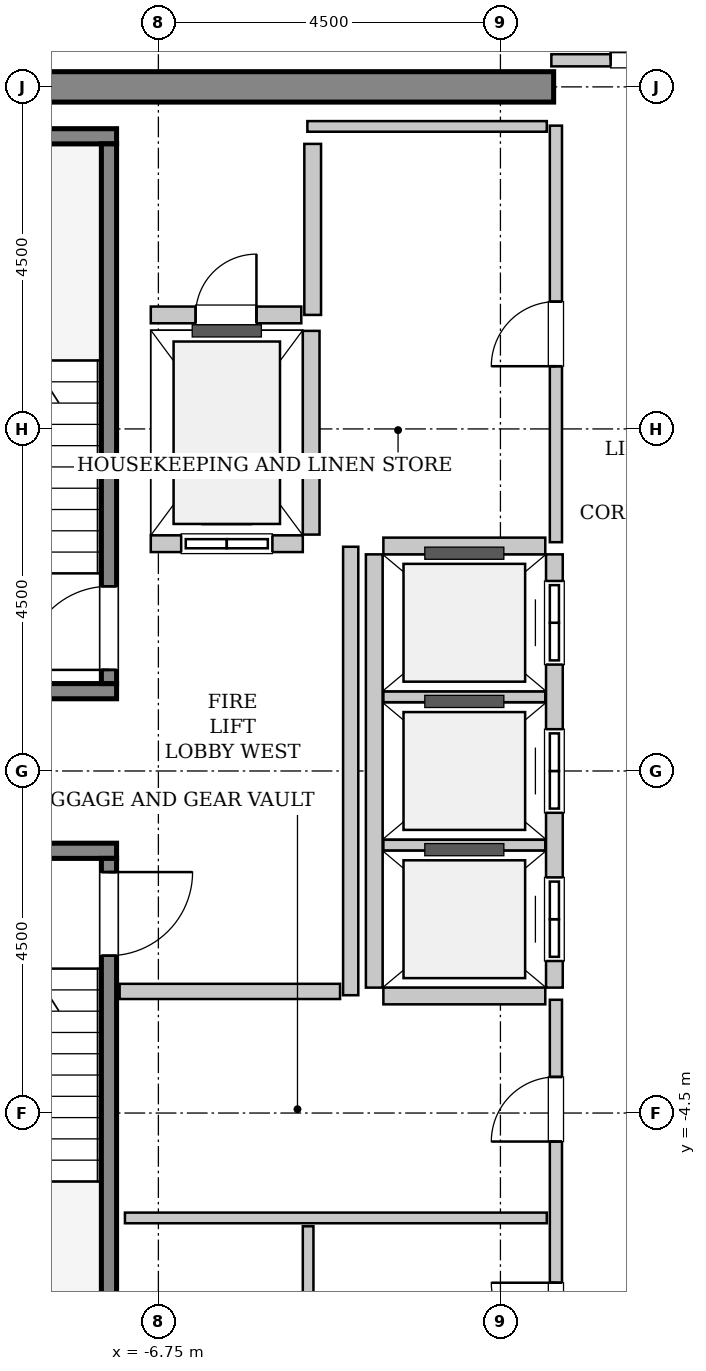
"""IFC4 building model, lengths in metres.
Left out: names, types, materials, properties, quantities, classifications, styles, units other than length and angle.
Written with IfcOpenShell. Run it as: python <this file> out.ifc"""

import sys

from ifc_helpers import new_model, si_unit, direction, frame, frame_2d, origin, place, context, subcontext, project, spatial, rectangle, extrude, source, transform, mapped, element, fill, save


model = new_model("IFC4")
c1 = context("Model", 3, precision=1e-05, world=origin(), true_north=direction((0.0, 1.0)))
c2 = subcontext(c1, "Body", "Model", "MODEL_VIEW")
j1 = project(units=[si_unit("LENGTHUNIT", "METRE"), si_unit("PLANEANGLEUNIT", "RADIAN")], contexts=[c1])
p1 = place(None, origin())
s1 = spatial("IfcSite", under=j1, at=p1, CompositionType="ELEMENT")
p2 = place(p1, origin())
s2 = spatial("IfcBuilding", under=s1, at=p2, CompositionType="ELEMENT")
p3 = place(p2, frame((0.0, 0.0, 322.4)))
s3 = spatial("IfcBuildingStorey", under=s2, at=p3, CompositionType="ELEMENT", Elevation=322.4)
m1 = source(origin(), c2, "Body", "SweptSolid", [
    extrude(rectangle(XDim=9.9, YDim=0.4, at=frame_2d((4.95, 0.0))), origin(), (0.0, 0.0, 1.0), 3.8),
])
p4 = place(p3, frame((-11.45, 9.0, 0.0), z_axis=(0.0, 0.0, 1.0), x_axis=(1.0, 0.0, 0.0)))
e1 = element("IfcWall", 1, at=p4, inside=s3, PredefinedType="SHEAR", context=c2, shape_type="MappedRepresentation", body=[
    mapped(m1, transform((0.0, 0.0, 0.0), x_axis=(1.0, 0.0, 0.0), y_axis=(0.0, 1.0, 0.0), z_axis=(0.0, 0.0, 1.0), scale=1.0)),
])
m2 = source(origin(), c2, "Body", "SweptSolid", [
    extrude(rectangle(XDim=3.4, YDim=0.2, at=frame_2d((1.7, 0.0))), origin(), (0.0, 0.0, 1.0), 3.8),
])
p5 = place(p3, frame((-7.3, 1.05, 0.0), z_axis=(0.0, 0.0, 1.0), x_axis=(-1.0, 0.0, 0.0)))
e2 = element("IfcWall", 2, at=p5, inside=s3, PredefinedType="SOLIDWALL", context=c2, shape_type="MappedRepresentation", body=[
    mapped(m2, transform((0.0, 0.0, 0.0), x_axis=(1.0, 0.0, 0.0), y_axis=(0.0, 1.0, 0.0), z_axis=(0.0, 0.0, 1.0), scale=1.0)),
])
m3 = source(origin(), c2, "Body", "SweptSolid", [
    extrude(rectangle(XDim=3.755, YDim=0.2, at=frame_2d((1.877, 0.0))), origin(), (0.0, 0.0, 1.0), 3.8),
])
p6 = place(p3, frame((-7.3, 8.35, 0.0), z_axis=(0.0, 0.0, 1.0), x_axis=(-1.0, 0.0, 0.0)))
e3 = element("IfcWall", 3, at=p6, inside=s3, PredefinedType="SOLIDWALL", context=c2, shape_type="MappedRepresentation", body=[
    mapped(m3, transform((0.0, 0.0, 0.0), x_axis=(1.0, 0.0, 0.0), y_axis=(0.0, 1.0, 0.0), z_axis=(0.0, 0.0, 1.0), scale=1.0)),
])
m4 = source(origin(), c2, "Body", "SweptSolid", [
    extrude(rectangle(XDim=7.1, YDim=0.2, at=frame_2d((3.55, 0.0))), origin(), (0.0, 0.0, 1.0), 3.8),
])
p7 = place(p3, frame((-7.4, 1.15, 0.0), z_axis=(0.0, 0.0, 1.0), x_axis=(0.0, 1.0, 0.0)))
e4 = element("IfcWall", 4, at=p7, inside=s3, PredefinedType="SOLIDWALL", context=c2, shape_type="MappedRepresentation", body=[
    mapped(m4, transform((0.0, 0.0, 0.0), x_axis=(1.0, 0.0, 0.0), y_axis=(0.0, 1.0, 0.0), z_axis=(0.0, 0.0, 1.0), scale=1.0)),
])
p8 = place(p7, frame((0.18, 0.0, 0.0)))
e5 = element("IfcOpeningElement", 5, at=p8, cuts=e4, PredefinedType="OPENING", context=c2, shape_type="SweptSolid", body=[
    extrude(rectangle(XDim=1.1, YDim=2.15, at=frame_2d((0.55, 1.075))), frame((0.0, 0.11, 0.0), z_axis=(0.0, -1.0, 0.0), x_axis=(1.0, 0.0, 0.0)), (0.0, 0.0, 1.0), 0.22),
])
p9 = place(p3, frame((-10.7, -1.05, 0.0), z_axis=(0.0, 0.0, 1.0), x_axis=(1.0, 0.0, 0.0)))
e6 = element("IfcWall", 6, at=p9, inside=s3, PredefinedType="SOLIDWALL", context=c2, shape_type="MappedRepresentation", body=[
    mapped(m2, transform((0.0, 0.0, 0.0), x_axis=(1.0, 0.0, 0.0), y_axis=(0.0, 1.0, 0.0), z_axis=(0.0, 0.0, 1.0), scale=1.0)),
])
p10 = place(p3, frame((-7.4, -1.15, 0.0), z_axis=(0.0, 0.0, 1.0), x_axis=(0.0, -1.0, 0.0)))
e7 = element("IfcWall", 7, at=p10, inside=s3, PredefinedType="SOLIDWALL", context=c2, shape_type="MappedRepresentation", body=[
    mapped(m4, transform((0.0, 0.0, 0.0), x_axis=(1.0, 0.0, 0.0), y_axis=(0.0, 1.0, 0.0), z_axis=(0.0, 0.0, 1.0), scale=1.0)),
])
p11 = place(p10, frame((0.18, 0.0, 0.0)))
e8 = element("IfcOpeningElement", 8, at=p11, cuts=e7, PredefinedType="OPENING", context=c2, shape_type="SweptSolid", body=[
    extrude(rectangle(XDim=1.1, YDim=2.15, at=frame_2d((0.55, 1.075))), frame((0.0, 0.11, 0.0), z_axis=(0.0, -1.0, 0.0), x_axis=(1.0, 0.0, 0.0)), (0.0, 0.0, 1.0), 0.22),
])
m5 = source(origin(), c2, "Body", "SweptSolid", [
    extrude(rectangle(XDim=2.0, YDim=0.22, at=frame_2d((1.0, 0.0))), origin(), (0.0, 0.0, 1.0), 3.535),
])
p12 = place(p3, frame((-6.85, 2.99, 0.0), z_axis=(0.0, 0.0, 1.0), x_axis=(1.0, 0.0, 0.0)))
e9 = element("IfcWall", 9, at=p12, inside=s3, PredefinedType="SOLIDWALL", context=c2, shape_type="MappedRepresentation", body=[
    mapped(m5, transform((0.0, 0.0, 0.0), x_axis=(1.0, 0.0, 0.0), y_axis=(0.0, 1.0, 0.0), z_axis=(0.0, 0.0, 1.0), scale=1.0)),
])
p13 = place(p12, frame((0.4, 0.0, 0.0)))
e10 = element("IfcOpeningElement", 10, at=p13, cuts=e9, PredefinedType="OPENING", context=c2, shape_type="SweptSolid", body=[
    extrude(rectangle(XDim=1.2, YDim=2.2, at=frame_2d((0.6, 1.1))), frame((0.0, 0.12, 0.0), z_axis=(0.0, -1.0, 0.0), x_axis=(1.0, 0.0, 0.0)), (0.0, 0.0, 1.0), 0.24),
])
m6 = source(origin(), c2, "Body", "SweptSolid", [
    extrude(rectangle(XDim=2.68, YDim=0.22, at=frame_2d((1.34, 0.0))), origin(), (0.0, 0.0, 1.0), 3.535),
])
p14 = place(p3, frame((-4.74, 3.11, 0.0), z_axis=(0.0, 0.0, 1.0), x_axis=(0.0, 1.0, 0.0)))
e11 = element("IfcWall", 11, at=p14, inside=s3, PredefinedType="SOLIDWALL", context=c2, shape_type="MappedRepresentation", body=[
    mapped(m6, transform((0.0, 0.0, 0.0), x_axis=(1.0, 0.0, 0.0), y_axis=(0.0, 1.0, 0.0), z_axis=(0.0, 0.0, 1.0), scale=1.0)),
])
m7 = source(origin(), c2, "Body", "SweptSolid", [
    extrude(rectangle(XDim=5.7, YDim=0.22, at=frame_2d((2.85, 0.0))), origin(), (0.0, 0.0, 1.0), 3.535),
])
p15 = place(p3, frame((-1.54, -2.85, 0.0), z_axis=(0.0, 0.0, 1.0), x_axis=(0.0, 1.0, 0.0)))
e12 = element("IfcWall", 12, at=p15, inside=s3, PredefinedType="SOLIDWALL", context=c2, shape_type="MappedRepresentation", body=[
    mapped(m7, transform((0.0, 0.0, 0.0), x_axis=(1.0, 0.0, 0.0), y_axis=(0.0, 1.0, 0.0), z_axis=(0.0, 0.0, 1.0), scale=1.0)),
])
p16 = place(p15, frame((0.35, 0.0, 0.0)))
e13 = element("IfcOpeningElement", 13, at=p16, cuts=e12, PredefinedType="OPENING", context=c2, shape_type="SweptSolid", body=[
    extrude(rectangle(XDim=1.1, YDim=2.2, at=frame_2d((0.55, 1.1))), frame((0.0, 0.12, 0.0), z_axis=(0.0, -1.0, 0.0), x_axis=(1.0, 0.0, 0.0)), (0.0, 0.0, 1.0), 0.24),
])
p17 = place(p15, frame((2.3, 0.0, 0.0)))
e14 = element("IfcOpeningElement", 14, at=p17, cuts=e12, PredefinedType="OPENING", context=c2, shape_type="SweptSolid", body=[
    extrude(rectangle(XDim=1.1, YDim=2.2, at=frame_2d((0.55, 1.1))), frame((0.0, 0.12, 0.0), z_axis=(0.0, -1.0, 0.0), x_axis=(1.0, 0.0, 0.0)), (0.0, 0.0, 1.0), 0.24),
])
p18 = place(p15, frame((4.25, 0.0, 0.0)))
e15 = element("IfcOpeningElement", 15, at=p18, cuts=e12, PredefinedType="OPENING", context=c2, shape_type="SweptSolid", body=[
    extrude(rectangle(XDim=1.1, YDim=2.2, at=frame_2d((0.55, 1.1))), frame((0.0, 0.12, 0.0), z_axis=(0.0, -1.0, 0.0), x_axis=(1.0, 0.0, 0.0)), (0.0, 0.0, 1.0), 0.24),
])
p19 = place(p3, frame((-3.91, 2.85, 0.0), z_axis=(0.0, 0.0, 1.0), x_axis=(0.0, -1.0, 0.0)))
e16 = element("IfcWall", 16, at=p19, inside=s3, PredefinedType="SOLIDWALL", context=c2, shape_type="MappedRepresentation", body=[
    mapped(m7, transform((0.0, 0.0, 0.0), x_axis=(1.0, 0.0, 0.0), y_axis=(0.0, 1.0, 0.0), z_axis=(0.0, 0.0, 1.0), scale=1.0)),
])
m8 = source(origin(), c2, "Body", "SweptSolid", [
    extrude(rectangle(XDim=2.13, YDim=0.22, at=frame_2d((1.065, 0.0))), origin(), (0.0, 0.0, 1.0), 3.535),
])
p20 = place(p3, frame((-3.79, -2.96, 0.0), z_axis=(0.0, 0.0, 1.0), x_axis=(1.0, 0.0, 0.0)))
e17 = element("IfcWall", 17, at=p20, inside=s3, PredefinedType="SOLIDWALL", context=c2, shape_type="MappedRepresentation", body=[
    mapped(m8, transform((0.0, 0.0, 0.0), x_axis=(1.0, 0.0, 0.0), y_axis=(0.0, 1.0, 0.0), z_axis=(0.0, 0.0, 1.0), scale=1.0)),
])
m9 = source(origin(), c2, "Body", "SweptSolid", [
    extrude(rectangle(XDim=2.13, YDim=0.14, at=frame_2d((1.065, 0.0))), origin(), (0.0, 0.0, 1.0), 3.535),
])
for number, where, z_axis, x_axis in (
    (18, (-3.79, -0.975, 0.0), (0.0, 0.0, 1.0), (1.0, 0.0, 0.0)),
    (19, (-3.79, 0.975, 0.0), (0.0, 0.0, 1.0), (1.0, 0.0, 0.0)),
):
    element("IfcWall", number, at=place(p3, frame(where, z_axis=z_axis, x_axis=x_axis)), inside=s3, PredefinedType="PARTITIONING", context=c2, shape_type="MappedRepresentation", body=[
        mapped(m9, transform((0.0, 0.0, 0.0), x_axis=(1.0, 0.0, 0.0), y_axis=(0.0, 1.0, 0.0), z_axis=(0.0, 0.0, 1.0), scale=1.0)),
    ])
p21 = place(p3, frame((-1.66, 2.96, 0.0), z_axis=(0.0, 0.0, 1.0), x_axis=(-1.0, 0.0, 0.0)))
e20 = element("IfcWall", 20, at=p21, inside=s3, PredefinedType="SOLIDWALL", context=c2, shape_type="MappedRepresentation", body=[
    mapped(m8, transform((0.0, 0.0, 0.0), x_axis=(1.0, 0.0, 0.0), y_axis=(0.0, 1.0, 0.0), z_axis=(0.0, 0.0, 1.0), scale=1.0)),
])
m10 = source(origin(), c2, "Body", "SweptSolid", [
    extrude(rectangle(XDim=2.25, YDim=0.22, at=frame_2d((1.125, 0.0))), origin(), (0.0, 0.0, 1.0), 3.535),
])
p22 = place(p3, frame((-4.72, 6.0, 0.0), z_axis=(0.0, 0.0, 1.0), x_axis=(0.0, 1.0, 0.0)))
e21 = element("IfcWall", 21, at=p22, inside=s3, PredefinedType="SOLIDWALL", context=c2, shape_type="MappedRepresentation", body=[
    mapped(m10, transform((0.0, 0.0, 0.0), x_axis=(1.0, 0.0, 0.0), y_axis=(0.0, 1.0, 0.0), z_axis=(0.0, 0.0, 1.0), scale=1.0)),
])
m11 = source(origin(), c2, "Body", "SweptSolid", [
    extrude(rectangle(XDim=1.98, YDim=0.22, at=frame_2d((0.99, 0.0))), origin(), (0.0, 0.0, 1.0), 3.535),
])
p23 = place(p3, frame((-6.85, 6.0, 0.0), z_axis=(0.0, 0.0, 1.0), x_axis=(1.0, 0.0, 0.0)))
e22 = element("IfcWall", 22, at=p23, inside=s3, PredefinedType="SOLIDWALL", context=c2, shape_type="MappedRepresentation", body=[
    mapped(m11, transform((0.0, 0.0, 0.0), x_axis=(1.0, 0.0, 0.0), y_axis=(0.0, 1.0, 0.0), z_axis=(0.0, 0.0, 1.0), scale=1.0)),
])
p24 = place(p23, frame((0.59, 0.0, 0.0)))
e23 = element("IfcOpeningElement", 23, at=p24, cuts=e22, PredefinedType="OPENING", context=c2, shape_type="SweptSolid", body=[
    extrude(rectangle(XDim=0.8, YDim=2.0, at=frame_2d((0.4, 1.0))), frame((0.0, 0.12, 0.0), z_axis=(0.0, -1.0, 0.0), x_axis=(1.0, 0.0, 0.0)), (0.0, 0.0, 1.0), 0.24),
])
m12 = source(origin(), c2, "Body", "SweptSolid", [
    extrude(rectangle(XDim=5.9, YDim=0.2, at=frame_2d((2.95, 0.0))), origin(), (0.0, 0.0, 1.0), 3.535),
])
p25 = place(p3, frame((-4.22, -2.95, 0.0), z_axis=(0.0, 0.0, 1.0), x_axis=(0.0, 1.0, 0.0)))
e24 = element("IfcWall", 24, at=p25, inside=s3, PredefinedType="PARTITIONING", context=c2, shape_type="MappedRepresentation", body=[
    mapped(m12, transform((0.0, 0.0, 0.0), x_axis=(1.0, 0.0, 0.0), y_axis=(0.0, 1.0, 0.0), z_axis=(0.0, 0.0, 1.0), scale=1.0)),
])
m13 = source(origin(), c2, "Body", "SweptSolid", [
    extrude(rectangle(XDim=2.9, YDim=0.2, at=frame_2d((1.45, 0.0))), origin(), (0.0, 0.0, 1.0), 3.535),
])
p26 = place(p3, frame((-7.26, -2.9, 0.0), z_axis=(0.0, 0.0, 1.0), x_axis=(1.0, 0.0, 0.0)))
e25 = element("IfcWall", 25, at=p26, inside=s3, PredefinedType="PARTITIONING", context=c2, shape_type="MappedRepresentation", body=[
    mapped(m13, transform((0.0, 0.0, 0.0), x_axis=(1.0, 0.0, 0.0), y_axis=(0.0, 1.0, 0.0), z_axis=(0.0, 0.0, 1.0), scale=1.0)),
])
m14 = source(origin(), c2, "Body", "SweptSolid", [
    extrude(rectangle(XDim=3.16, YDim=0.16, at=frame_2d((1.58, 0.0))), origin(), (0.0, 0.0, 1.0), 2.625),
])
p27 = place(p3, frame((-1.58, 9.35, 0.0), z_axis=(0.0, 0.0, 1.0), x_axis=(1.0, 0.0, 0.0)))
e26 = element("IfcWall", 26, at=p27, inside=s3, PredefinedType="PARTITIONING", context=c2, shape_type="MappedRepresentation", body=[
    mapped(m14, transform((0.0, 0.0, 0.0), x_axis=(1.0, 0.0, 0.0), y_axis=(0.0, 1.0, 0.0), z_axis=(0.0, 0.0, 1.0), scale=1.0)),
])
p28 = place(p27, frame((0.78, 0.0, 0.0)))
e27 = element("IfcOpeningElement", 27, at=p28, cuts=e26, PredefinedType="OPENING", context=c2, shape_type="SweptSolid", body=[
    extrude(rectangle(XDim=1.6, YDim=2.3, at=frame_2d((0.8, 1.15))), frame((0.0, 0.09, 0.0), z_axis=(0.0, -1.0, 0.0), x_axis=(1.0, 0.0, 0.0)), (0.0, 0.0, 1.0), 0.18),
])
m15 = source(origin(), c2, "Body", "SweptSolid", [
    extrude(rectangle(XDim=5.48, YDim=0.16, at=frame_2d((2.74, 0.0))), origin(), (0.0, 0.0, 1.0), 3.535),
])
p29 = place(p3, frame((-1.52, 3.01, 0.0), z_axis=(0.0, 0.0, 1.0), x_axis=(0.0, 1.0, 0.0)))
e28 = element("IfcWall", 28, at=p29, inside=s3, PredefinedType="PARTITIONING", context=c2, shape_type="MappedRepresentation", body=[
    mapped(m15, transform((0.0, 0.0, 0.0), x_axis=(1.0, 0.0, 0.0), y_axis=(0.0, 1.0, 0.0), z_axis=(0.0, 0.0, 1.0), scale=1.0)),
])
p30 = place(p29, frame((2.315, 0.0, 0.0)))
e29 = element("IfcOpeningElement", 29, at=p30, cuts=e28, PredefinedType="OPENING", context=c2, shape_type="SweptSolid", body=[
    extrude(rectangle(XDim=0.85, YDim=2.1, at=frame_2d((0.425, 1.05))), frame((0.0, 0.09, 0.0), z_axis=(0.0, -1.0, 0.0), x_axis=(1.0, 0.0, 0.0)), (0.0, 0.0, 1.0), 0.18),
])
m16 = source(origin(), c2, "Body", "SweptSolid", [
    extrude(rectangle(XDim=3.15, YDim=0.14, at=frame_2d((1.575, 0.0))), origin(), (0.0, 0.0, 1.0), 3.535),
])
p31 = place(p3, frame((-4.79, 8.48, 0.0), z_axis=(0.0, 0.0, 1.0), x_axis=(1.0, 0.0, 0.0)))
e30 = element("IfcWall", 30, at=p31, inside=s3, PredefinedType="PARTITIONING", context=c2, shape_type="MappedRepresentation", body=[
    mapped(m16, transform((0.0, 0.0, 0.0), x_axis=(1.0, 0.0, 0.0), y_axis=(0.0, 1.0, 0.0), z_axis=(0.0, 0.0, 1.0), scale=1.0)),
])
p32 = place(p3, frame((-1.52, -8.49, 0.0), z_axis=(0.0, 0.0, 1.0), x_axis=(0.0, 1.0, 0.0)))
e31 = element("IfcWall", 31, at=p32, inside=s3, PredefinedType="PARTITIONING", context=c2, shape_type="MappedRepresentation", body=[
    mapped(m15, transform((0.0, 0.0, 0.0), x_axis=(1.0, 0.0, 0.0), y_axis=(0.0, 1.0, 0.0), z_axis=(0.0, 0.0, 1.0), scale=1.0)),
])
p33 = place(p32, frame((0.907, 0.0, 0.0)))
e32 = element("IfcOpeningElement", 32, at=p33, cuts=e31, PredefinedType="OPENING", context=c2, shape_type="SweptSolid", body=[
    extrude(rectangle(XDim=0.85, YDim=2.1, at=frame_2d((0.425, 1.05))), frame((0.0, 0.09, 0.0), z_axis=(0.0, -1.0, 0.0), x_axis=(1.0, 0.0, 0.0)), (0.0, 0.0, 1.0), 0.18),
])
p34 = place(p32, frame((3.615, 0.0, 0.0)))
e33 = element("IfcOpeningElement", 33, at=p34, cuts=e31, PredefinedType="OPENING", context=c2, shape_type="SweptSolid", body=[
    extrude(rectangle(XDim=0.85, YDim=2.1, at=frame_2d((0.425, 1.05))), frame((0.0, 0.09, 0.0), z_axis=(0.0, -1.0, 0.0), x_axis=(1.0, 0.0, 0.0)), (0.0, 0.0, 1.0), 0.18),
])
m17 = source(origin(), c2, "Body", "SweptSolid", [
    extrude(rectangle(XDim=5.55, YDim=0.14, at=frame_2d((2.775, 0.0))), origin(), (0.0, 0.0, 1.0), 3.535),
])
p35 = place(p3, frame((-7.19, -5.88, 0.0), z_axis=(0.0, 0.0, 1.0), x_axis=(1.0, 0.0, 0.0)))
e34 = element("IfcWall", 34, at=p35, inside=s3, PredefinedType="PARTITIONING", context=c2, shape_type="MappedRepresentation", body=[
    mapped(m17, transform((0.0, 0.0, 0.0), x_axis=(1.0, 0.0, 0.0), y_axis=(0.0, 1.0, 0.0), z_axis=(0.0, 0.0, 1.0), scale=1.0)),
])
m18 = source(origin(), c2, "Body", "SweptSolid", [
    extrude(rectangle(XDim=2.38, YDim=0.14, at=frame_2d((1.19, 0.0))), origin(), (0.0, 0.0, 1.0), 3.535),
])
p36 = place(p3, frame((-4.78, -8.37, 0.0), z_axis=(0.0, 0.0, 1.0), x_axis=(0.0, 1.0, 0.0)))
e35 = element("IfcWall", 35, at=p36, inside=s3, PredefinedType="PARTITIONING", context=c2, shape_type="MappedRepresentation", body=[
    mapped(m18, transform((0.0, 0.0, 0.0), x_axis=(1.0, 0.0, 0.0), y_axis=(0.0, 1.0, 0.0), z_axis=(0.0, 0.0, 1.0), scale=1.0)),
])
m19 = source(origin(), c2, "Body", "SweptSolid", [
    extrude(rectangle(XDim=1.1, YDim=2.15, at=frame_2d((0.55, 1.075))), frame((0.0, 0.025, 0.0), z_axis=(0.0, -1.0, 0.0), x_axis=(1.0, 0.0, 0.0)), (0.0, 0.0, 1.0), 0.05),
])
p37 = place(p8, origin())
e36 = element("IfcDoor", 36, at=p37, inside=s3, OperationType="SINGLE_SWING_LEFT", PredefinedType="DOOR", context=c2, shape_type="MappedRepresentation", body=[
    mapped(m19, transform((0.0, 0.0, 0.0), x_axis=(1.0, 0.0, 0.0), y_axis=(0.0, 1.0, 0.0), z_axis=(0.0, 0.0, 1.0), scale=1.0)),
])
fill(e5, e36)
p38 = place(p11, origin())
e37 = element("IfcDoor", 37, at=p38, inside=s3, OperationType="SINGLE_SWING_LEFT", PredefinedType="DOOR", context=c2, shape_type="MappedRepresentation", body=[
    mapped(m19, transform((0.0, 0.0, 0.0), x_axis=(1.0, 0.0, 0.0), y_axis=(0.0, 1.0, 0.0), z_axis=(0.0, 0.0, 1.0), scale=1.0)),
])
fill(e8, e37)
m20 = source(origin(), c2, "Body", "SweptSolid", [
    extrude(rectangle(XDim=1.2, YDim=2.2, at=frame_2d((0.6, 1.1))), frame((0.0, 0.025, 0.0), z_axis=(0.0, -1.0, 0.0), x_axis=(1.0, 0.0, 0.0)), (0.0, 0.0, 1.0), 0.05),
])
p39 = place(p13, origin())
e38 = element("IfcDoor", 38, at=p39, inside=s3, OperationType="SLIDING_TO_LEFT", PredefinedType="DOOR", context=c2, shape_type="MappedRepresentation", body=[
    mapped(m20, transform((0.0, 0.0, 0.0), x_axis=(1.0, 0.0, 0.0), y_axis=(0.0, 1.0, 0.0), z_axis=(0.0, 0.0, 1.0), scale=1.0)),
])
fill(e10, e38)
m21 = source(origin(), c2, "Body", "SweptSolid", [
    extrude(rectangle(XDim=1.1, YDim=2.2, at=frame_2d((0.55, 1.1))), frame((0.0, 0.025, 0.0), z_axis=(0.0, -1.0, 0.0), x_axis=(1.0, 0.0, 0.0)), (0.0, 0.0, 1.0), 0.05),
])
p40 = place(p16, origin())
e39 = element("IfcDoor", 39, at=p40, inside=s3, OperationType="DOUBLE_DOOR_SLIDING", PredefinedType="DOOR", context=c2, shape_type="MappedRepresentation", body=[
    mapped(m21, transform((0.0, 0.0, 0.0), x_axis=(1.0, 0.0, 0.0), y_axis=(0.0, 1.0, 0.0), z_axis=(0.0, 0.0, 1.0), scale=1.0)),
])
fill(e13, e39)
p41 = place(p17, origin())
e40 = element("IfcDoor", 40, at=p41, inside=s3, OperationType="DOUBLE_DOOR_SLIDING", PredefinedType="DOOR", context=c2, shape_type="MappedRepresentation", body=[
    mapped(m21, transform((0.0, 0.0, 0.0), x_axis=(1.0, 0.0, 0.0), y_axis=(0.0, 1.0, 0.0), z_axis=(0.0, 0.0, 1.0), scale=1.0)),
])
fill(e14, e40)
p42 = place(p18, origin())
e41 = element("IfcDoor", 41, at=p42, inside=s3, OperationType="DOUBLE_DOOR_SLIDING", PredefinedType="DOOR", context=c2, shape_type="MappedRepresentation", body=[
    mapped(m21, transform((0.0, 0.0, 0.0), x_axis=(1.0, 0.0, 0.0), y_axis=(0.0, 1.0, 0.0), z_axis=(0.0, 0.0, 1.0), scale=1.0)),
])
fill(e15, e41)
m22 = source(origin(), c2, "Body", "SweptSolid", [
    extrude(rectangle(XDim=0.8, YDim=2.0, at=frame_2d((0.4, 1.0))), frame((0.0, 0.025, 0.0), z_axis=(0.0, -1.0, 0.0), x_axis=(1.0, 0.0, 0.0)), (0.0, 0.0, 1.0), 0.05),
])
p43 = place(p24, origin())
e42 = element("IfcDoor", 42, at=p43, inside=s3, OperationType="SINGLE_SWING_RIGHT", PredefinedType="TRAPDOOR", context=c2, shape_type="MappedRepresentation", body=[
    mapped(m22, transform((0.0, 0.0, 0.0), x_axis=(1.0, 0.0, 0.0), y_axis=(0.0, 1.0, 0.0), z_axis=(0.0, 0.0, 1.0), scale=1.0)),
])
fill(e23, e42)
m23 = source(origin(), c2, "Body", "SweptSolid", [
    extrude(rectangle(XDim=1.6, YDim=2.3, at=frame_2d((0.8, 1.15))), frame((0.0, 0.025, 0.0), z_axis=(0.0, -1.0, 0.0), x_axis=(1.0, 0.0, 0.0)), (0.0, 0.0, 1.0), 0.05),
])
p44 = place(p28, origin())
e43 = element("IfcDoor", 43, at=p44, inside=s3, OperationType="DOUBLE_DOOR_SINGLE_SWING", PredefinedType="DOOR", context=c2, shape_type="MappedRepresentation", body=[
    mapped(m23, transform((0.0, 0.0, 0.0), x_axis=(1.0, 0.0, 0.0), y_axis=(0.0, 1.0, 0.0), z_axis=(0.0, 0.0, 1.0), scale=1.0)),
])
fill(e27, e43)
m24 = source(origin(), c2, "Body", "SweptSolid", [
    extrude(rectangle(XDim=0.85, YDim=2.1, at=frame_2d((0.425, 1.05))), frame((0.0, 0.025, 0.0), z_axis=(0.0, -1.0, 0.0), x_axis=(1.0, 0.0, 0.0)), (0.0, 0.0, 1.0), 0.05),
])
p45 = place(p30, origin())
e44 = element("IfcDoor", 44, at=p45, inside=s3, OperationType="SINGLE_SWING_LEFT", PredefinedType="DOOR", context=c2, shape_type="MappedRepresentation", body=[
    mapped(m24, transform((0.0, 0.0, 0.0), x_axis=(1.0, 0.0, 0.0), y_axis=(0.0, 1.0, 0.0), z_axis=(0.0, 0.0, 1.0), scale=1.0)),
])
fill(e29, e44)
p46 = place(p33, origin())
e45 = element("IfcDoor", 45, at=p46, inside=s3, OperationType="SINGLE_SWING_RIGHT", PredefinedType="DOOR", context=c2, shape_type="MappedRepresentation", body=[
    mapped(m24, transform((0.0, 0.0, 0.0), x_axis=(1.0, 0.0, 0.0), y_axis=(0.0, 1.0, 0.0), z_axis=(0.0, 0.0, 1.0), scale=1.0)),
])
fill(e32, e45)
p47 = place(p34, origin())
e46 = element("IfcDoor", 46, at=p47, inside=s3, OperationType="SINGLE_SWING_LEFT", PredefinedType="DOOR", context=c2, shape_type="MappedRepresentation", body=[
    mapped(m24, transform((0.0, 0.0, 0.0), x_axis=(1.0, 0.0, 0.0), y_axis=(0.0, 1.0, 0.0), z_axis=(0.0, 0.0, 1.0), scale=1.0)),
])
fill(e33, e46)
save(model, sys.argv[1])
